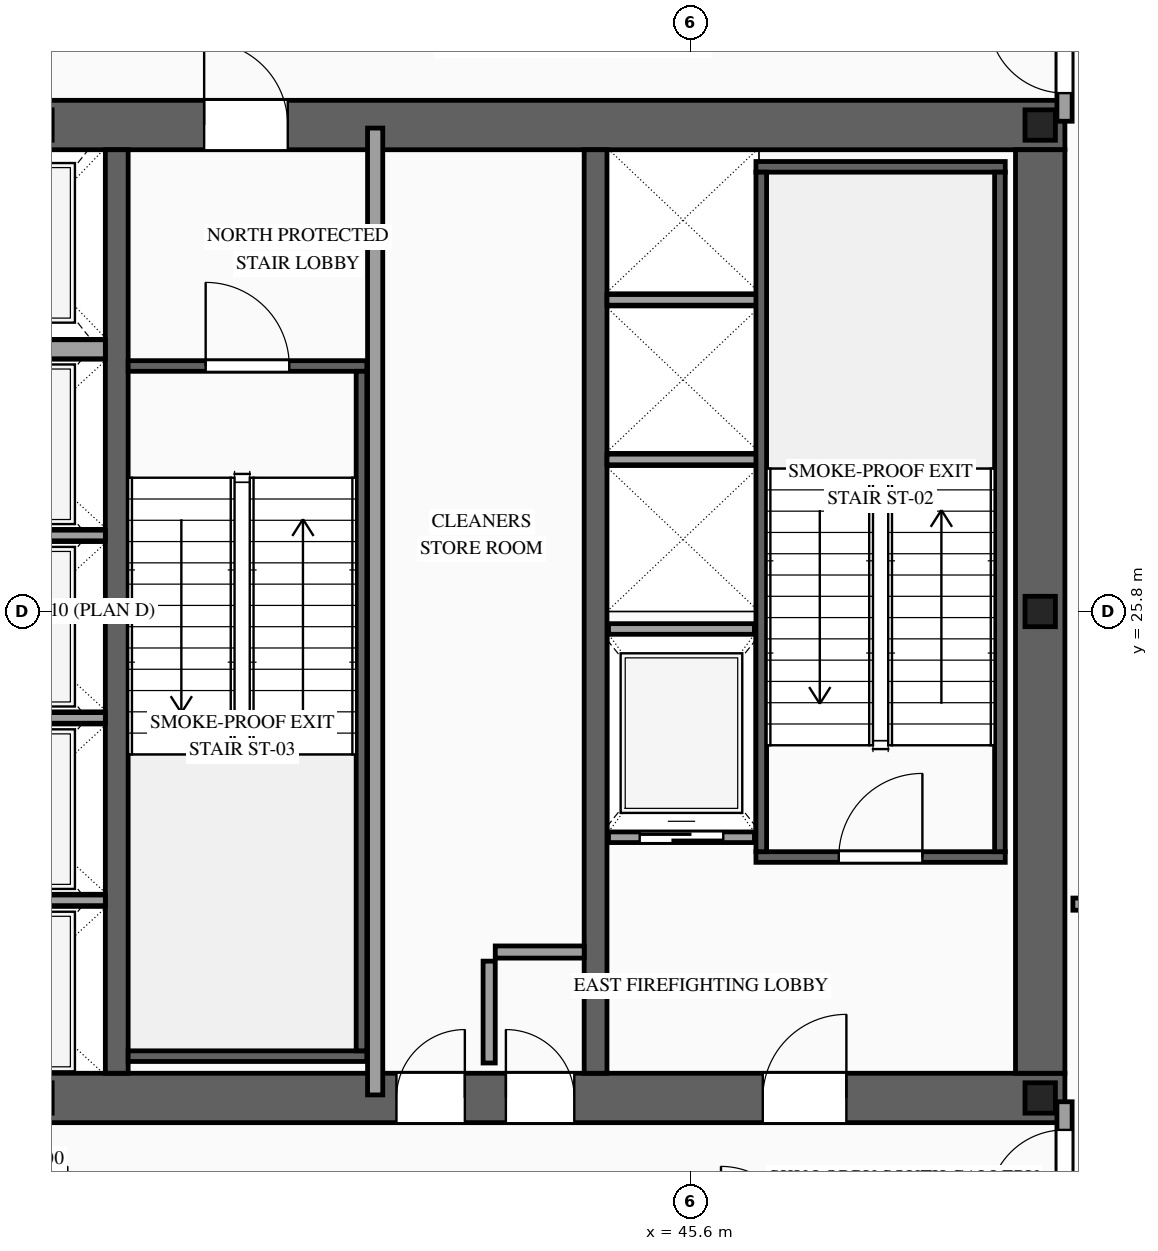
"""IFC4 building model, lengths in metres.
Left out: names, types, materials, properties, quantities, classifications, styles, units other than length and angle.
Written with IfcOpenShell. Run it as: python <this file> out.ifc"""

import sys

from ifc_helpers import new_model, si_unit, direction, frame, frame_2d, origin, origin_2d, place, context, subcontext, project, spatial, rectangle, i_section, extrude, source, transform, mapped, element, fill, save


model = new_model("IFC4")
c1 = context("Model", 3, precision=1e-05, world=origin(), true_north=direction((0.0, 1.0)))
c2 = subcontext(c1, "Body", "Model", "MODEL_VIEW")
j1 = project(units=[si_unit("LENGTHUNIT", "METRE"), si_unit("PLANEANGLEUNIT", "RADIAN")], contexts=[c1])
p1 = place(None, origin())
s1 = spatial("IfcSite", under=j1, at=p1, CompositionType="ELEMENT")
p2 = place(p1, origin())
s2 = spatial("IfcBuilding", under=s1, at=p2, CompositionType="ELEMENT")
p3 = place(p2, frame((0.0, 0.0, 171.6)))
s3 = spatial("IfcBuildingStorey", under=s2, at=p3, CompositionType="ELEMENT", Elevation=171.6)
p4 = place(p3, frame((23.475, 19.4, 0.0), z_axis=(0.0, 0.0, 1.0), x_axis=(1.0, 0.0, 0.0)))
e1 = element("IfcWall", 1, at=p4, inside=s3, PredefinedType="SHEAR", context=c2, shape_type="SweptSolid", body=[
    extrude(rectangle(XDim=27.05, YDim=0.65, at=frame_2d((13.525, 0.0))), origin(), (0.0, 0.0, 1.0), 4.8),
])
p5 = place(p4, frame((1.975, 0.0, 0.0)))
e2 = element("IfcOpeningElement", 2, at=p5, cuts=e1, PredefinedType="OPENING", context=c2, shape_type="SweptSolid", body=[
    extrude(rectangle(XDim=1.1, YDim=2.2, at=frame_2d((0.55, 1.1))), frame((0.0, 0.34, 0.0), z_axis=(0.0, -1.0, 0.0), x_axis=(1.0, 0.0, 0.0)), (0.0, 0.0, 1.0), 0.68),
])
p6 = place(p4, frame((9.875, 0.0, 0.0)))
e3 = element("IfcOpeningElement", 3, at=p6, cuts=e1, PredefinedType="OPENING", context=c2, shape_type="SweptSolid", body=[
    extrude(rectangle(XDim=1.1, YDim=2.2, at=frame_2d((0.55, 1.1))), frame((0.0, 0.34, 0.0), z_axis=(0.0, -1.0, 0.0), x_axis=(1.0, 0.0, 0.0)), (0.0, 0.0, 1.0), 0.68),
])
p7 = place(p4, frame((23.075, 0.0, 0.0)))
e4 = element("IfcOpeningElement", 4, at=p7, cuts=e1, PredefinedType="OPENING", context=c2, shape_type="SweptSolid", body=[
    extrude(rectangle(XDim=1.1, YDim=2.2, at=frame_2d((0.55, 1.1))), frame((0.0, 0.34, 0.0), z_axis=(0.0, -1.0, 0.0), x_axis=(1.0, 0.0, 0.0)), (0.0, 0.0, 1.0), 0.68),
])
p8 = place(p4, frame((19.695, 0.0, 0.0)))
e5 = element("IfcOpeningElement", 5, at=p8, cuts=e1, PredefinedType="OPENING", context=c2, shape_type="SweptSolid", body=[
    extrude(rectangle(XDim=0.9, YDim=2.15, at=frame_2d((0.45, 1.075))), frame((0.0, 0.34, 0.0), z_axis=(0.0, -1.0, 0.0), x_axis=(1.0, 0.0, 0.0)), (0.0, 0.0, 1.0), 0.68),
])
p9 = place(p4, frame((18.255, 0.0, 0.0)))
e6 = element("IfcOpeningElement", 6, at=p9, cuts=e1, PredefinedType="OPENING", context=c2, shape_type="SweptSolid", body=[
    extrude(rectangle(XDim=0.9, YDim=2.15, at=frame_2d((0.45, 1.075))), frame((0.0, 0.34, 0.0), z_axis=(0.0, -1.0, 0.0), x_axis=(1.0, 0.0, 0.0)), (0.0, 0.0, 1.0), 0.68),
])
p10 = place(p3, frame((23.475, 32.2, 0.0), z_axis=(0.0, 0.0, 1.0), x_axis=(1.0, 0.0, 0.0)))
e7 = element("IfcWall", 7, at=p10, inside=s3, PredefinedType="SHEAR", context=c2, shape_type="SweptSolid", body=[
    extrude(rectangle(XDim=27.05, YDim=0.65, at=frame_2d((13.525, 0.0))), origin(), (0.0, 0.0, 1.0), 4.8),
])
p11 = place(p10, frame((4.595, 0.0, 0.0)))
e8 = element("IfcOpeningElement", 8, at=p11, cuts=e7, PredefinedType="OPENING", context=c2, shape_type="SweptSolid", body=[
    extrude(rectangle(XDim=0.9, YDim=2.15, at=frame_2d((0.45, 1.075))), frame((0.0, 0.34, 0.0), z_axis=(0.0, -1.0, 0.0), x_axis=(1.0, 0.0, 0.0)), (0.0, 0.0, 1.0), 0.68),
])
p12 = place(p10, frame((9.875, 0.0, 0.0)))
e9 = element("IfcOpeningElement", 9, at=p12, cuts=e7, PredefinedType="OPENING", context=c2, shape_type="SweptSolid", body=[
    extrude(rectangle(XDim=1.1, YDim=2.2, at=frame_2d((0.55, 1.1))), frame((0.0, 0.34, 0.0), z_axis=(0.0, -1.0, 0.0), x_axis=(1.0, 0.0, 0.0)), (0.0, 0.0, 1.0), 0.68),
])
p13 = place(p10, frame((15.725, 0.0, 0.0)))
e10 = element("IfcOpeningElement", 10, at=p13, cuts=e7, PredefinedType="OPENING", context=c2, shape_type="SweptSolid", body=[
    extrude(rectangle(XDim=1.1, YDim=2.2, at=frame_2d((0.55, 1.1))), frame((0.0, 0.34, 0.0), z_axis=(0.0, -1.0, 0.0), x_axis=(1.0, 0.0, 0.0)), (0.0, 0.0, 1.0), 0.68),
])
m1 = source(origin(), c2, "Body", "SweptSolid", [
    extrude(rectangle(XDim=12.15, YDim=0.65, at=frame_2d((6.075, 0.0))), origin(), (0.0, 0.0, 1.0), 4.8),
])
p14 = place(p3, frame((50.2, 19.725, 0.0), z_axis=(0.0, 0.0, 1.0), x_axis=(0.0, 1.0, 0.0)))
e11 = element("IfcWall", 11, at=p14, inside=s3, PredefinedType="SHEAR", context=c2, shape_type="MappedRepresentation", body=[
    mapped(m1, transform((0.0, 0.0, 0.0), scale=1.0)),
])
m2 = source(origin(), c2, "Body", "SweptSolid", [
    extrude(rectangle(XDim=12.15, YDim=0.3, at=frame_2d((6.075, 0.0))), origin(), (0.0, 0.0, 1.0), 4.8),
])
for number, where, z_axis, x_axis in (
    (12, (38.05, 19.725, 0.0), (0.0, 0.0, 1.0), (0.0, 1.0, 0.0)),
    (13, (44.35, 19.725, 0.0), (0.0, 0.0, 1.0), (0.0, 1.0, 0.0)),
):
    element("IfcWall", number, at=place(p3, frame(where, z_axis=z_axis, x_axis=x_axis)), inside=s3, PredefinedType="SOLIDWALL", context=c2, shape_type="MappedRepresentation", body=[
        mapped(m2, transform((0.0, 0.0, 0.0), scale=1.0)),
    ])
m3 = source(origin(), c2, "Body", "SweptSolid", [
    extrude(i_section(OverallWidth=0.4, OverallDepth=0.4, WebThickness=0.013, FlangeThickness=0.021, at=origin_2d()), origin(), (0.0, 0.0, 1.0), 4.8),
])
for number, where, z_axis, x_axis in (
    (14, (50.2, 19.4, 0.0), (0.0, 0.0, 1.0), (1.0, 0.0, 0.0)),
    (15, (50.2, 25.8, 0.0), (0.0, 0.0, 1.0), (1.0, 0.0, 0.0)),
    (16, (50.2, 32.2, 0.0), (0.0, 0.0, 1.0), (1.0, 0.0, 0.0)),
):
    element("IfcColumn", number, at=place(p3, frame(where, z_axis=z_axis, x_axis=x_axis)), inside=s3, PredefinedType="COLUMN", context=c2, shape_type="MappedRepresentation", body=[
        mapped(m3, transform((0.0, 0.0, 0.0), scale=1.0)),
    ])
p15 = place(p3, frame((44.52, 22.83, 0.0), z_axis=(0.0, 0.0, 1.0), x_axis=(1.0, 0.0, 0.0)))
e17 = element("IfcWall", 17, at=p15, inside=s3, PredefinedType="SOLIDWALL", context=c2, shape_type="SweptSolid", body=[
    extrude(rectangle(XDim=1.92, YDim=0.14, at=frame_2d((0.96, 0.0))), origin(), (0.0, 0.0, 1.0), 4.52),
])
p16 = place(p15, frame((0.41, 0.0, 0.0)))
e18 = element("IfcOpeningElement", 18, at=p16, cuts=e17, PredefinedType="OPENING", context=c2, shape_type="SweptSolid", body=[
    extrude(rectangle(XDim=1.1, YDim=2.2, at=frame_2d((0.55, 1.1))), frame((0.0, 0.085, 0.0), z_axis=(0.0, -1.0, 0.0), x_axis=(1.0, 0.0, 0.0)), (0.0, 0.0, 1.0), 0.17),
])
m4 = source(origin(), c2, "Body", "SweptSolid", [
    extrude(rectangle(XDim=1.92, YDim=0.14, at=frame_2d((0.96, 0.0))), origin(), (0.0, 0.0, 1.0), 4.52),
])
p17 = place(p3, frame((44.52, 25.57, 0.0), z_axis=(0.0, 0.0, 1.0), x_axis=(1.0, 0.0, 0.0)))
e19 = element("IfcWall", 19, at=p17, inside=s3, PredefinedType="SOLIDWALL", context=c2, shape_type="MappedRepresentation", body=[
    mapped(m4, transform((0.0, 0.0, 0.0), scale=1.0)),
])
m5 = source(origin(), c2, "Body", "SweptSolid", [
    extrude(rectangle(XDim=2.4, YDim=0.14, at=frame_2d((1.2, 0.0))), origin(), (0.0, 0.0, 1.0), 4.52),
])
for number, where, z_axis, x_axis in (
    (20, (35.5, 22.0, 0.0), (0.0, 0.0, 1.0), (1.0, 0.0, 0.0)),
    (21, (35.5, 24.4, 0.0), (0.0, 0.0, 1.0), (1.0, 0.0, 0.0)),
    (22, (35.5, 26.8, 0.0), (0.0, 0.0, 1.0), (1.0, 0.0, 0.0)),
):
    element("IfcWall", number, at=place(p3, frame(where, z_axis=z_axis, x_axis=x_axis)), inside=s3, PredefinedType="SOLIDWALL", context=c2, shape_type="MappedRepresentation", body=[
        mapped(m5, transform((0.0, 0.0, 0.0), scale=1.0)),
    ])
m6 = source(origin(), c2, "Body", "SweptSolid", [
    extrude(rectangle(XDim=2.4, YDim=0.25, at=frame_2d((1.2, 0.0))), origin(), (0.0, 0.0, 1.0), 4.52),
])
p18 = place(p3, frame((35.5, 29.25, 0.0), z_axis=(0.0, 0.0, 1.0), x_axis=(1.0, 0.0, 0.0)))
e23 = element("IfcWall", 23, at=p18, inside=s3, PredefinedType="SOLIDWALL", context=c2, shape_type="MappedRepresentation", body=[
    mapped(m6, transform((0.0, 0.0, 0.0), scale=1.0)),
])
m7 = source(origin(), c2, "Body", "SweptSolid", [
    extrude(rectangle(XDim=2.0, YDim=0.14, at=frame_2d((1.0, 0.0))), origin(), (0.0, 0.0, 1.0), 4.52),
])
for number, where, z_axis, x_axis in (
    (24, (44.5, 27.8, 0.0), (0.0, 0.0, 1.0), (1.0, 0.0, 0.0)),
    (25, (44.5, 29.9, 0.0), (0.0, 0.0, 1.0), (1.0, 0.0, 0.0)),
):
    element("IfcWall", number, at=place(p3, frame(where, z_axis=z_axis, x_axis=x_axis)), inside=s3, PredefinedType="SOLIDWALL", context=c2, shape_type="MappedRepresentation", body=[
        mapped(m7, transform((0.0, 0.0, 0.0), scale=1.0)),
    ])
p19 = place(p3, frame((46.46, 22.57, 0.0), z_axis=(0.0, 0.0, 1.0), x_axis=(1.0, 0.0, 0.0)))
e26 = element("IfcWall", 26, at=p19, inside=s3, PredefinedType="SOLIDWALL", context=c2, shape_type="SweptSolid", body=[
    extrude(rectangle(XDim=3.28, YDim=0.14, at=frame_2d((1.64, 0.0))), origin(), (0.0, 0.0, 1.0), 4.52),
])
p20 = place(p19, frame((1.09, 0.0, 0.0)))
e27 = element("IfcOpeningElement", 27, at=p20, cuts=e26, PredefinedType="OPENING", context=c2, shape_type="SweptSolid", body=[
    extrude(rectangle(XDim=1.1, YDim=2.2, at=frame_2d((0.55, 1.1))), frame((0.0, 0.085, 0.0), z_axis=(0.0, -1.0, 0.0), x_axis=(1.0, 0.0, 0.0)), (0.0, 0.0, 1.0), 0.17),
])
m8 = source(origin(), c2, "Body", "SweptSolid", [
    extrude(rectangle(XDim=3.28, YDim=0.14, at=frame_2d((1.64, 0.0))), origin(), (0.0, 0.0, 1.0), 4.52),
])
p21 = place(p3, frame((46.46, 31.65, 0.0), z_axis=(0.0, 0.0, 1.0), x_axis=(1.0, 0.0, 0.0)))
e28 = element("IfcWall", 28, at=p21, inside=s3, PredefinedType="SOLIDWALL", context=c2, shape_type="MappedRepresentation", body=[
    mapped(m8, transform((0.0, 0.0, 0.0), scale=1.0)),
])
m9 = source(origin(), c2, "Body", "SweptSolid", [
    extrude(rectangle(XDim=8.94, YDim=0.14, at=frame_2d((4.47, 0.0))), origin(), (0.0, 0.0, 1.0), 4.52),
])
for number, where, z_axis, x_axis in (
    (29, (46.53, 22.64, 0.0), (0.0, 0.0, 1.0), (0.0, 1.0, 0.0)),
    (30, (49.67, 22.64, 0.0), (0.0, 0.0, 1.0), (0.0, 1.0, 0.0)),
):
    element("IfcWall", number, at=place(p3, frame(where, z_axis=z_axis, x_axis=x_axis)), inside=s3, PredefinedType="SOLIDWALL", context=c2, shape_type="MappedRepresentation", body=[
        mapped(m9, transform((0.0, 0.0, 0.0), scale=1.0)),
    ])
p22 = place(p3, frame((38.2, 29.03, 0.0), z_axis=(0.0, 0.0, 1.0), x_axis=(1.0, 0.0, 0.0)))
e31 = element("IfcWall", 31, at=p22, inside=s3, PredefinedType="SOLIDWALL", context=c2, shape_type="SweptSolid", body=[
    extrude(rectangle(XDim=3.14, YDim=0.14, at=frame_2d((1.57, 0.0))), origin(), (0.0, 0.0, 1.0), 4.52),
])
p23 = place(p22, frame((1.02, 0.0, 0.0)))
e32 = element("IfcOpeningElement", 32, at=p23, cuts=e31, PredefinedType="OPENING", context=c2, shape_type="SweptSolid", body=[
    extrude(rectangle(XDim=1.1, YDim=2.2, at=frame_2d((0.55, 1.1))), frame((0.0, 0.085, 0.0), z_axis=(0.0, -1.0, 0.0), x_axis=(1.0, 0.0, 0.0)), (0.0, 0.0, 1.0), 0.17),
])
m10 = source(origin(), c2, "Body", "SweptSolid", [
    extrude(rectangle(XDim=3.14, YDim=0.14, at=frame_2d((1.57, 0.0))), origin(), (0.0, 0.0, 1.0), 4.52),
])
p24 = place(p3, frame((38.2, 19.95, 0.0), z_axis=(0.0, 0.0, 1.0), x_axis=(1.0, 0.0, 0.0)))
e33 = element("IfcWall", 33, at=p24, inside=s3, PredefinedType="SOLIDWALL", context=c2, shape_type="MappedRepresentation", body=[
    mapped(m10, transform((0.0, 0.0, 0.0), scale=1.0)),
])
m11 = source(origin(), c2, "Body", "SweptSolid", [
    extrude(rectangle(XDim=8.94, YDim=0.14, at=frame_2d((4.47, 0.0))), origin(), (0.0, 0.0, 1.0), 4.52),
])
p25 = place(p3, frame((41.27, 20.02, 0.0), z_axis=(0.0, 0.0, 1.0), x_axis=(0.0, 1.0, 0.0)))
e34 = element("IfcWall", 34, at=p25, inside=s3, PredefinedType="SOLIDWALL", context=c2, shape_type="MappedRepresentation", body=[
    mapped(m11, transform((0.0, 0.0, 0.0), scale=1.0)),
])
m12 = source(origin(), c2, "Body", "SweptSolid", [
    extrude(rectangle(XDim=1.34, YDim=0.16, at=frame_2d((0.67, 0.0))), origin(), (0.0, 0.0, 1.0), 4.52),
])
p26 = place(p3, frame((42.95, 19.86, 0.0), z_axis=(0.0, 0.0, 1.0), x_axis=(0.0, 1.0, 0.0)))
e35 = element("IfcWall", 35, at=p26, inside=s3, PredefinedType="PARTITIONING", context=c2, shape_type="MappedRepresentation", body=[
    mapped(m12, transform((0.0, 0.0, 0.0), scale=1.0)),
])
m13 = source(origin(), c2, "Body", "SweptSolid", [
    extrude(rectangle(XDim=1.17, YDim=0.16, at=frame_2d((0.585, 0.0))), origin(), (0.0, 0.0, 1.0), 4.52),
])
p27 = place(p3, frame((43.03, 21.32, 0.0), z_axis=(0.0, 0.0, 1.0), x_axis=(1.0, 0.0, 0.0)))
e36 = element("IfcWall", 36, at=p27, inside=s3, PredefinedType="PARTITIONING", context=c2, shape_type="MappedRepresentation", body=[
    mapped(m13, transform((0.0, 0.0, 0.0), scale=1.0)),
])
m14 = source(origin(), c2, "Body", "SweptSolid", [
    extrude(rectangle(XDim=12.72, YDim=0.2, at=frame_2d((6.36, 0.0))), origin(), (0.0, 0.0, 1.0), 4.52),
])
p28 = place(p3, frame((41.45, 19.44, 0.0), z_axis=(0.0, 0.0, 1.0), x_axis=(0.0, 1.0, 0.0)))
e37 = element("IfcWall", 37, at=p28, inside=s3, PredefinedType="PARTITIONING", context=c2, shape_type="MappedRepresentation", body=[
    mapped(m14, transform((0.0, 0.0, 0.0), scale=1.0)),
])
p29 = place(p3, frame((50.52, 17.61, 0.0), z_axis=(0.0, 0.0, 1.0), x_axis=(0.0, 1.0, 0.0)))
e38 = element("IfcWall", 38, at=p29, inside=s3, PredefinedType="PARTITIONING", context=c2, shape_type="SweptSolid", body=[
    extrude(rectangle(XDim=1.74, YDim=0.2, at=frame_2d((0.87, 0.0))), origin(), (0.0, 0.0, 1.0), 4.52),
])
p30 = place(p29, frame((0.37, 0.0, 0.0)))
e39 = element("IfcOpeningElement", 39, at=p30, cuts=e38, PredefinedType="OPENING", context=c2, shape_type="SweptSolid", body=[
    extrude(rectangle(XDim=1.0, YDim=2.2, at=frame_2d((0.5, 1.1))), frame((0.0, 0.115, 0.0), z_axis=(0.0, -1.0, 0.0), x_axis=(1.0, 0.0, 0.0)), (0.0, 0.0, 1.0), 0.23),
])
m15 = source(origin(), c2, "Body", "SweptSolid", [
    extrude(rectangle(XDim=8.32, YDim=0.16, at=frame_2d((4.16, 0.0))), origin(), (0.0, 0.0, 1.0), 4.52),
])
p31 = place(p3, frame((50.63, 21.95, 0.0), z_axis=(0.0, 0.0, 1.0), x_axis=(1.0, 0.0, 0.0)))
e40 = element("IfcWall", 40, at=p31, inside=s3, PredefinedType="PARTITIONING", context=c2, shape_type="MappedRepresentation", body=[
    mapped(m15, transform((0.0, 0.0, 0.0), scale=1.0)),
])
p32 = place(p3, frame((50.52, 32.25, 0.0), z_axis=(0.0, 0.0, 1.0), x_axis=(0.0, 1.0, 0.0)))
e41 = element("IfcWall", 41, at=p32, inside=s3, PredefinedType="PARTITIONING", context=c2, shape_type="SweptSolid", body=[
    extrude(rectangle(XDim=1.74, YDim=0.2, at=frame_2d((0.87, 0.0))), origin(), (0.0, 0.0, 1.0), 4.52),
])
p33 = place(p32, frame((0.37, 0.0, 0.0)))
e42 = element("IfcOpeningElement", 42, at=p33, cuts=e41, PredefinedType="OPENING", context=c2, shape_type="SweptSolid", body=[
    extrude(rectangle(XDim=1.0, YDim=2.2, at=frame_2d((0.5, 1.1))), frame((0.0, 0.115, 0.0), z_axis=(0.0, -1.0, 0.0), x_axis=(1.0, 0.0, 0.0)), (0.0, 0.0, 1.0), 0.23),
])
m16 = source(origin(), c2, "Body", "SweptSolid", [
    extrude(rectangle(XDim=1.1, YDim=2.2, at=frame_2d((0.55, 1.1))), frame((0.0, 0.025, 0.0), z_axis=(0.0, -1.0, 0.0), x_axis=(1.0, 0.0, 0.0)), (0.0, 0.0, 1.0), 0.05),
])
p34 = place(p16, origin())
e43 = element("IfcDoor", 43, at=p34, inside=s3, OperationType="SLIDING_TO_RIGHT", PredefinedType="DOOR", context=c2, shape_type="MappedRepresentation", body=[
    mapped(m16, transform((0.0, 0.0, 0.0), scale=1.0)),
])
fill(e18, e43)
m17 = source(origin(), c2, "Body", "SweptSolid", [
    extrude(rectangle(XDim=1.1, YDim=2.2, at=frame_2d((0.55, 1.1))), frame((0.0, 0.025, 0.0), z_axis=(0.0, -1.0, 0.0), x_axis=(1.0, 0.0, 0.0)), (0.0, 0.0, 1.0), 0.05),
])
p35 = place(p20, origin())
e44 = element("IfcDoor", 44, at=p35, inside=s3, OperationType="SINGLE_SWING_RIGHT", PredefinedType="DOOR", context=c2, shape_type="MappedRepresentation", body=[
    mapped(m17, transform((0.0, 0.0, 0.0), scale=1.0)),
])
fill(e27, e44)
p36 = place(p23, origin())
e45 = element("IfcDoor", 45, at=p36, inside=s3, OperationType="SINGLE_SWING_LEFT", PredefinedType="DOOR", context=c2, shape_type="MappedRepresentation", body=[
    mapped(m17, transform((0.0, 0.0, 0.0), scale=1.0)),
])
fill(e32, e45)
p37 = place(p7, origin())
e46 = element("IfcDoor", 46, at=p37, inside=s3, OperationType="SINGLE_SWING_RIGHT", PredefinedType="DOOR", context=c2, shape_type="MappedRepresentation", body=[
    mapped(m17, transform((0.0, 0.0, 0.0), scale=1.0)),
])
fill(e4, e46)
p38 = place(p13, origin())
e47 = element("IfcDoor", 47, at=p38, inside=s3, OperationType="SINGLE_SWING_LEFT", PredefinedType="DOOR", context=c2, shape_type="MappedRepresentation", body=[
    mapped(m17, transform((0.0, 0.0, 0.0), scale=1.0)),
])
fill(e10, e47)
m18 = source(origin(), c2, "Body", "SweptSolid", [
    extrude(rectangle(XDim=0.9, YDim=2.15, at=frame_2d((0.45, 1.075))), frame((0.0, 0.025, 0.0), z_axis=(0.0, -1.0, 0.0), x_axis=(1.0, 0.0, 0.0)), (0.0, 0.0, 1.0), 0.05),
])
p39 = place(p8, origin())
e48 = element("IfcDoor", 48, at=p39, inside=s3, OperationType="SINGLE_SWING_LEFT", PredefinedType="DOOR", context=c2, shape_type="MappedRepresentation", body=[
    mapped(m18, transform((0.0, 0.0, 0.0), scale=1.0)),
])
fill(e5, e48)
p40 = place(p9, origin())
e49 = element("IfcDoor", 49, at=p40, inside=s3, OperationType="SINGLE_SWING_RIGHT", PredefinedType="DOOR", context=c2, shape_type="MappedRepresentation", body=[
    mapped(m18, transform((0.0, 0.0, 0.0), scale=1.0)),
])
fill(e6, e49)
m19 = source(origin(), c2, "Body", "SweptSolid", [
    extrude(rectangle(XDim=1.0, YDim=2.2, at=frame_2d((0.5, 1.1))), frame((0.0, 0.025, 0.0), z_axis=(0.0, -1.0, 0.0), x_axis=(1.0, 0.0, 0.0)), (0.0, 0.0, 1.0), 0.05),
])
p41 = place(p30, origin())
e50 = element("IfcDoor", 50, at=p41, inside=s3, OperationType="SINGLE_SWING_LEFT", PredefinedType="DOOR", context=c2, shape_type="MappedRepresentation", body=[
    mapped(m19, transform((0.0, 0.0, 0.0), scale=1.0)),
])
fill(e39, e50)
p42 = place(p33, origin())
e51 = element("IfcDoor", 51, at=p42, inside=s3, OperationType="SINGLE_SWING_RIGHT", PredefinedType="DOOR", context=c2, shape_type="MappedRepresentation", body=[
    mapped(m19, transform((0.0, 0.0, 0.0), scale=1.0)),
])
fill(e42, e51)
save(model, sys.argv[1])
